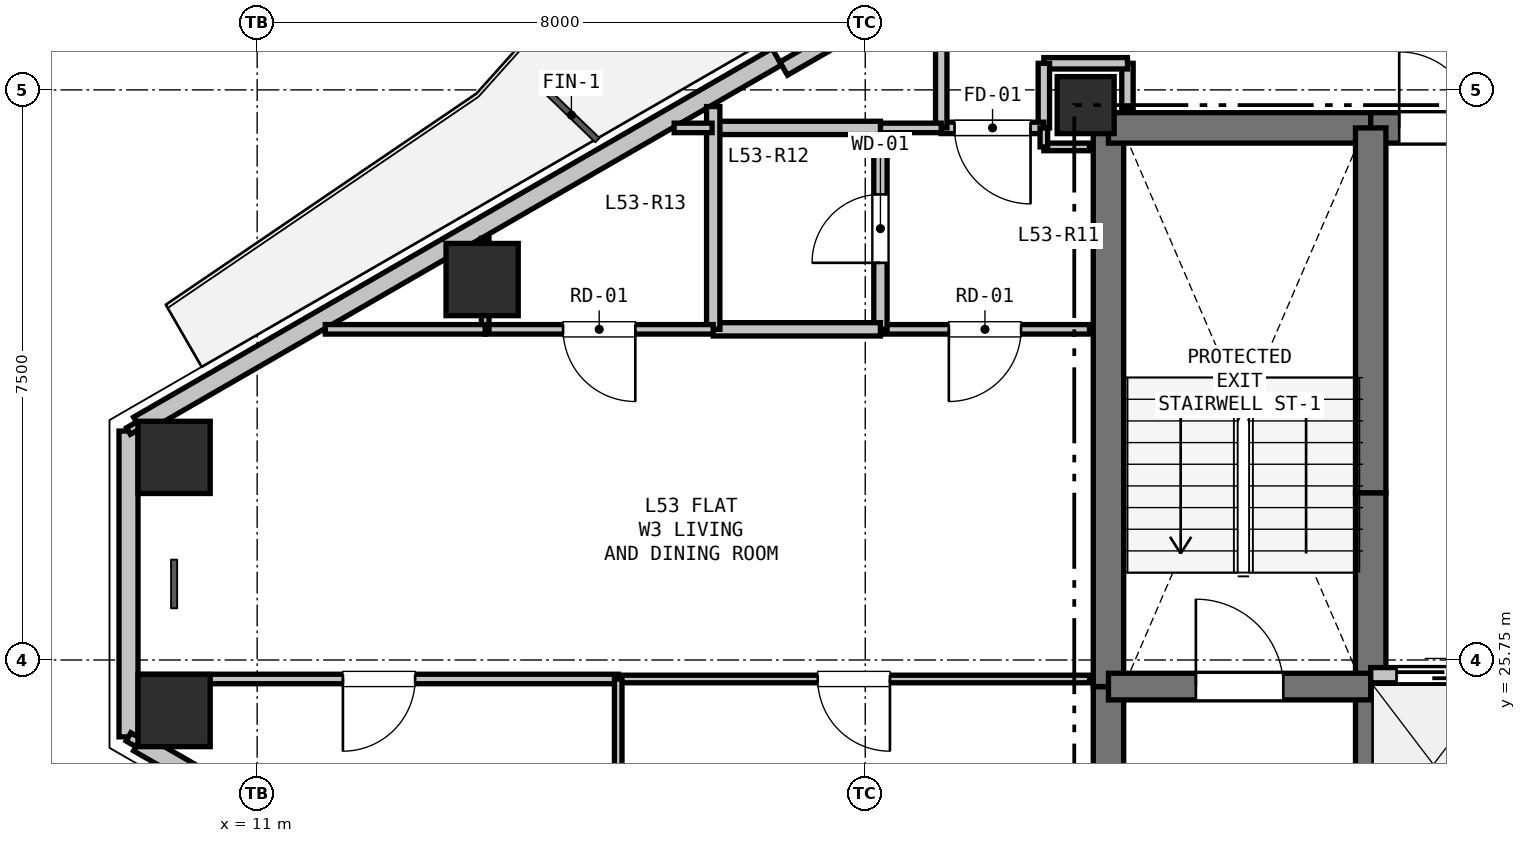
"""IFC4 building model, lengths in metres.
Left out: names, types, materials, properties, quantities, classifications, styles, units other than length and angle.
Written with IfcOpenShell. Run it as: python <this file> out.ifc"""

import sys

from ifc_helpers import new_model, si_unit, direction, frame, frame_2d, origin, origin_2d, place, context, subcontext, project, spatial, rectangle, hollow_rectangle, extrude, element, fill, save


model = new_model("IFC4")
c1 = context("Model", 3, precision=1e-05, world=origin(), true_north=direction((0.0, 1.0)))
c2 = subcontext(c1, "Body", "Model", "MODEL_VIEW")
j1 = project(units=[si_unit("LENGTHUNIT", "METRE"), si_unit("PLANEANGLEUNIT", "RADIAN")], contexts=[c1])
p1 = place(None, origin())
s1 = spatial("IfcSite", under=j1, at=p1, CompositionType="ELEMENT")
p2 = place(p1, origin())
s2 = spatial("IfcBuilding", under=s1, at=p2, CompositionType="ELEMENT")
p3 = place(p2, frame((0.0, 0.0, 192.0)))
s3 = spatial("IfcBuildingStorey", under=s2, at=p3, CompositionType="ELEMENT", Elevation=192.0)
p4 = place(p3, frame((21.9, 33.05, 0.0), z_axis=(0.0, 0.0, 1.0), x_axis=(1.0, 0.0, 0.0)))
e1 = element("IfcColumn", 1, at=p4, inside=s3, PredefinedType="COLUMN", context=c2, shape_type="SweptSolid", body=[
    extrude(rectangle(XDim=0.75, YDim=0.75, at=origin_2d()), origin(), (0.0, 0.0, 1.0), 3.3),
])
for number, where, z_axis, x_axis in (
    (2, (9.907, 28.415, 0.0), (0.0, 0.0, 1.0), (1.0, 0.0, 0.0)),
    (3, (13.96, 30.755, 0.0), (0.0, 0.0, 1.0), (1.0, 0.0, 0.0)),
    (4, (9.907, 25.085, 0.0), (0.0, 0.0, 1.0), (1.0, 0.0, 0.0)),
):
    element("IfcColumn", number, at=place(p3, frame(where, z_axis=z_axis, x_axis=x_axis)), inside=s3, PredefinedType="COLUMN", context=c2, shape_type="SweptSolid", body=[
        extrude(hollow_rectangle(XDim=0.95, YDim=0.95, WallThickness=0.028, at=origin_2d()), origin(), (0.0, 0.0, 1.0), 3.3),
    ])
p5 = place(p3, frame((9.308, 24.738, 0.0), z_axis=(0.0, 0.0, 1.0), x_axis=(0.0, 1.0, 0.0)))
e5 = element("IfcWall", 5, at=p5, inside=s3, PredefinedType="SOLIDWALL", context=c2, shape_type="SweptSolid", body=[
    extrude(rectangle(XDim=4.023, YDim=0.25, at=frame_2d((2.012, 0.0))), origin(), (0.0, 0.0, 1.0), 2.69),
])
p6 = place(p3, frame((9.438, 28.837, 0.0), z_axis=(0.0, 0.0, 1.0), x_axis=(0.866027133173, 0.499997004599, 0.0)))
e6 = element("IfcWall", 6, at=p6, inside=s3, PredefinedType="SOLIDWALL", context=c2, shape_type="SweptSolid", body=[
    extrude(rectangle(XDim=9.699, YDim=0.25, at=frame_2d((4.849, 0.0))), origin(), (0.0, 0.0, 1.0), 2.69),
])
p7 = place(p3, frame((17.927, 33.53, 0.0), z_axis=(0.0, 0.0, 1.0), x_axis=(0.86605165483, 0.499954529098, 0.0)))
e7 = element("IfcWall", 7, at=p7, inside=s3, PredefinedType="PARAPET", context=c2, shape_type="SweptSolid", body=[
    extrude(rectangle(XDim=1.7, YDim=0.2, at=frame_2d((0.85, 0.0))), origin(), (0.0, 0.0, 1.0), 2.69),
])
p8 = place(p3, frame((17.837, 19.814, 0.0), z_axis=(0.0, 0.0, 1.0), x_axis=(-0.866027133173, 0.499997004599, 0.0)))
e8 = element("IfcWall", 8, at=p8, inside=s3, PredefinedType="SOLIDWALL", context=c2, shape_type="SweptSolid", body=[
    extrude(rectangle(XDim=9.699, YDim=0.25, at=frame_2d((4.849, 0.0))), origin(), (0.0, 0.0, 1.0), 2.69),
])
p9 = place(p8, frame((5.512, 0.0, 0.9)))
e9 = element("IfcOpeningElement", 9, at=p9, cuts=e8, PredefinedType="OPENING", context=c2, shape_type="SweptSolid", body=[
    extrude(rectangle(XDim=1.2, YDim=1.4, at=frame_2d((0.6, 0.7))), frame((0.0, 0.135, 0.0), z_axis=(0.0, -1.0, 0.0), x_axis=(1.0, 0.0, 0.0)), (0.0, 0.0, 1.0), 0.27),
])
p10 = place(p3, frame((22.2, 20.75, 0.0), z_axis=(0.0, 0.0, 1.0), x_axis=(0.0, 1.0, 0.0)))
e10 = element("IfcWall", 10, at=p10, inside=s3, PredefinedType="SHEAR", context=c2, shape_type="SweptSolid", body=[
    extrude(rectangle(XDim=4.65, YDim=0.4, at=frame_2d((2.325, 0.0))), origin(), (0.0, 0.0, 1.0), 3.07),
])
p11 = place(p3, frame((22.2, 25.4, 0.0), z_axis=(0.0, 0.0, 1.0), x_axis=(0.0, 1.0, 0.0)))
e11 = element("IfcWall", 11, at=p11, inside=s3, PredefinedType="SHEAR", context=c2, shape_type="SweptSolid", body=[
    extrude(rectangle(XDim=7.35, YDim=0.4, at=frame_2d((3.675, 0.0))), origin(), (0.0, 0.0, 1.0), 3.07),
])
p12 = place(p3, frame((22.2, 32.75, 0.0), z_axis=(0.0, 0.0, 1.0), x_axis=(1.0, 0.0, 0.0)))
e12 = element("IfcWall", 12, at=p12, inside=s3, PredefinedType="SHEAR", context=c2, shape_type="SweptSolid", body=[
    extrude(rectangle(XDim=3.45, YDim=0.4, at=frame_2d((1.725, 0.0))), origin(), (0.0, 0.0, 1.0), 3.07),
])
p13 = place(p3, frame((25.65, 32.75, 0.0), z_axis=(0.0, 0.0, 1.0), x_axis=(1.0, 0.0, 0.0)))
e13 = element("IfcWall", 13, at=p13, inside=s3, PredefinedType="SHEAR", context=c2, shape_type="SweptSolid", body=[
    extrude(rectangle(XDim=1.75, YDim=0.4, at=frame_2d((0.875, 0.0))), origin(), (0.0, 0.0, 1.0), 3.07),
])
p14 = place(p13, frame((0.375, 0.0, 0.0)))
e14 = element("IfcOpeningElement", 14, at=p14, cuts=e13, PredefinedType="OPENING", context=c2, shape_type="SweptSolid", body=[
    extrude(rectangle(XDim=1.0, YDim=2.15, at=frame_2d((0.5, 1.075))), frame((0.0, 0.21, 0.0), z_axis=(0.0, -1.0, 0.0), x_axis=(1.0, 0.0, 0.0)), (0.0, 0.0, 1.0), 0.42),
])
p15 = place(p3, frame((25.65, 22.75, 0.0), z_axis=(0.0, 0.0, 1.0), x_axis=(0.0, 1.0, 0.0)))
e15 = element("IfcWall", 15, at=p15, inside=s3, PredefinedType="SHEAR", context=c2, shape_type="SweptSolid", body=[
    extrude(rectangle(XDim=2.8, YDim=0.4, at=frame_2d((1.4, 0.0))), origin(), (0.0, 0.0, 1.0), 3.07),
])
p16 = place(p3, frame((25.65, 25.55, 0.0), z_axis=(0.0, 0.0, 1.0), x_axis=(0.0, 1.0, 0.0)))
e16 = element("IfcWall", 16, at=p16, inside=s3, PredefinedType="SHEAR", context=c2, shape_type="SweptSolid", body=[
    extrude(rectangle(XDim=2.4, YDim=0.4, at=frame_2d((1.2, 0.0))), origin(), (0.0, 0.0, 1.0), 3.07),
])
p17 = place(p3, frame((25.65, 27.95, 0.0), z_axis=(0.0, 0.0, 1.0), x_axis=(0.0, 1.0, 0.0)))
e17 = element("IfcWall", 17, at=p17, inside=s3, PredefinedType="SHEAR", context=c2, shape_type="SweptSolid", body=[
    extrude(rectangle(XDim=4.8, YDim=0.4, at=frame_2d((2.4, 0.0))), origin(), (0.0, 0.0, 1.0), 3.07),
])
p18 = place(p3, frame((22.2, 25.4, 0.0), z_axis=(0.0, 0.0, 1.0), x_axis=(1.0, 0.0, 0.0)))
e18 = element("IfcWall", 18, at=p18, inside=s3, PredefinedType="SHEAR", context=c2, shape_type="SweptSolid", body=[
    extrude(rectangle(XDim=3.45, YDim=0.35, at=frame_2d((1.725, 0.0))), origin(), (0.0, 0.0, 1.0), 3.07),
])
p19 = place(p18, frame((1.15, 0.0, 0.0)))
e19 = element("IfcOpeningElement", 19, at=p19, cuts=e18, PredefinedType="OPENING", context=c2, shape_type="SweptSolid", body=[
    extrude(rectangle(XDim=1.15, YDim=2.15, at=frame_2d((0.575, 1.075))), frame((0.0, 0.185, 0.0), z_axis=(0.0, -1.0, 0.0), x_axis=(1.0, 0.0, 0.0)), (0.0, 0.0, 1.0), 0.37),
])
p20 = place(p3, frame((25.65, 25.55, 0.0), z_axis=(0.0, 0.0, 1.0), x_axis=(1.0, 0.0, 0.0)))
e20 = element("IfcWall", 20, at=p20, inside=s3, PredefinedType="PARTITIONING", context=c2, shape_type="SweptSolid", body=[
    extrude(rectangle(XDim=4.95, YDim=0.2, at=frame_2d((2.475, 0.0))), origin(), (0.0, 0.0, 1.0), 3.07),
])
p21 = place(p20, frame((0.34, 0.0, 0.0)))
e21 = element("IfcOpeningElement", 21, at=p21, cuts=e20, PredefinedType="OPENING", context=c2, shape_type="SweptSolid", body=[
    extrude(rectangle(XDim=1.1, YDim=2.15, at=frame_2d((0.55, 1.075))), frame((0.0, 0.11, 0.0), z_axis=(0.0, -1.0, 0.0), x_axis=(1.0, 0.0, 0.0)), (0.0, 0.0, 1.0), 0.22),
])
p22 = place(p20, frame((1.99, 0.0, 0.0)))
e22 = element("IfcOpeningElement", 22, at=p22, cuts=e20, PredefinedType="OPENING", context=c2, shape_type="SweptSolid", body=[
    extrude(rectangle(XDim=1.1, YDim=2.15, at=frame_2d((0.55, 1.075))), frame((0.0, 0.11, 0.0), z_axis=(0.0, -1.0, 0.0), x_axis=(1.0, 0.0, 0.0)), (0.0, 0.0, 1.0), 0.22),
])
p23 = place(p20, frame((3.64, 0.0, 0.0)))
e23 = element("IfcOpeningElement", 23, at=p23, cuts=e20, PredefinedType="OPENING", context=c2, shape_type="SweptSolid", body=[
    extrude(rectangle(XDim=1.1, YDim=2.15, at=frame_2d((0.55, 1.075))), frame((0.0, 0.11, 0.0), z_axis=(0.0, -1.0, 0.0), x_axis=(1.0, 0.0, 0.0)), (0.0, 0.0, 1.0), 0.22),
])
p24 = place(p3, frame((22.45, 33.0, 0.0), z_axis=(0.0, 0.0, 1.0), x_axis=(0.0, 1.0, 0.0)))
e24 = element("IfcWall", 24, at=p24, inside=s3, PredefinedType="PARTITIONING", context=c2, shape_type="SweptSolid", body=[
    extrude(rectangle(XDim=0.6, YDim=0.15, at=frame_2d((0.3, 0.0))), origin(), (0.0, 0.0, 1.0), 2.595),
])
p25 = place(p3, frame((22.45, 33.6, 0.0), z_axis=(0.0, 0.0, 1.0), x_axis=(-1.0, 0.0, 0.0)))
e25 = element("IfcWall", 25, at=p25, inside=s3, PredefinedType="PARTITIONING", context=c2, shape_type="SweptSolid", body=[
    extrude(rectangle(XDim=1.1, YDim=0.15, at=frame_2d((0.55, 0.0))), origin(), (0.0, 0.0, 1.0), 3.07),
])
p26 = place(p3, frame((21.35, 33.6, 0.0), z_axis=(0.0, 0.0, 1.0), x_axis=(0.0, -1.0, 0.0)))
e26 = element("IfcWall", 26, at=p26, inside=s3, PredefinedType="PARTITIONING", context=c2, shape_type="SweptSolid", body=[
    extrude(rectangle(XDim=0.85, YDim=0.15, at=frame_2d((0.425, 0.0))), origin(), (0.0, 0.0, 1.0), 2.518),
])
p27 = place(p3, frame((21.35, 32.75, 0.0), z_axis=(0.0, 0.0, 1.0), x_axis=(-1.0, 0.0, 0.0)))
e27 = element("IfcWall", 27, at=p27, inside=s3, PredefinedType="PARTITIONING", context=c2, shape_type="SweptSolid", body=[
    extrude(rectangle(XDim=1.35, YDim=0.15, at=frame_2d((0.675, 0.0))), origin(), (0.0, 0.0, 1.0), 2.518),
])
p28 = place(p27, frame((0.175, 0.0, 0.0)))
e28 = element("IfcOpeningElement", 28, at=p28, cuts=e27, PredefinedType="OPENING", context=c2, shape_type="SweptSolid", body=[
    extrude(rectangle(XDim=1.0, YDim=2.15, at=frame_2d((0.5, 1.075))), frame((0.0, 0.085, 0.0), z_axis=(0.0, -1.0, 0.0), x_axis=(1.0, 0.0, 0.0)), (0.0, 0.0, 1.0), 0.17),
])
p29 = place(p3, frame((20.0, 32.75, 0.0), z_axis=(0.0, 0.0, 1.0), x_axis=(0.0, 1.0, 0.0)))
e29 = element("IfcWall", 29, at=p29, inside=s3, PredefinedType="PARTITIONING", context=c2, shape_type="SweptSolid", body=[
    extrude(rectangle(XDim=2.141, YDim=0.15, at=frame_2d((1.071, 0.0))), origin(), (0.0, 0.0, 1.0), 2.365),
])
p30 = place(p3, frame((21.35, 32.5, 0.0), z_axis=(0.0, 0.0, 1.0), x_axis=(1.0, 0.0, 0.0)))
e30 = element("IfcWall", 30, at=p30, inside=s3, PredefinedType="PARTITIONING", context=c2, shape_type="SweptSolid", body=[
    extrude(rectangle(XDim=0.6, YDim=0.1, at=frame_2d((0.3, 0.0))), origin(), (0.0, 0.0, 1.0), 2.595),
])
p31 = place(p3, frame((21.95, 30.1, 0.0), z_axis=(0.0, 0.0, 1.0), x_axis=(-1.0, 0.0, 0.0)))
e31 = element("IfcWall", 31, at=p31, inside=s3, PredefinedType="PARTITIONING", context=c2, shape_type="SweptSolid", body=[
    extrude(rectangle(XDim=2.75, YDim=0.125, at=frame_2d((1.375, 0.0))), origin(), (0.0, 0.0, 1.0), 2.595),
])
p32 = place(p31, frame((0.9, 0.0, 0.0)))
e32 = element("IfcOpeningElement", 32, at=p32, cuts=e31, PredefinedType="OPENING", context=c2, shape_type="SweptSolid", body=[
    extrude(rectangle(XDim=0.95, YDim=2.1, at=frame_2d((0.475, 1.05))), frame((0.0, 0.073, 0.0), z_axis=(0.0, -1.0, 0.0), x_axis=(1.0, 0.0, 0.0)), (0.0, 0.0, 1.0), 0.145),
])
p33 = place(p3, frame((19.2, 30.1, 0.0), z_axis=(0.0, 0.0, 1.0), x_axis=(0.0, 1.0, 0.0)))
e33 = element("IfcWall", 33, at=p33, inside=s3, PredefinedType="PLUMBINGWALL", context=c2, shape_type="SweptSolid", body=[
    extrude(rectangle(XDim=2.65, YDim=0.175, at=frame_2d((1.325, 0.0))), origin(), (0.0, 0.0, 1.0), 2.518),
])
p34 = place(p33, frame((0.875, 0.0, 0.0)))
e34 = element("IfcOpeningElement", 34, at=p34, cuts=e33, PredefinedType="OPENING", context=c2, shape_type="SweptSolid", body=[
    extrude(rectangle(XDim=0.9, YDim=2.1, at=frame_2d((0.45, 1.05))), frame((0.0, 0.097, 0.0), z_axis=(0.0, -1.0, 0.0), x_axis=(1.0, 0.0, 0.0)), (0.0, 0.0, 1.0), 0.195),
])
p35 = place(p3, frame((19.2, 32.75, 0.0), z_axis=(0.0, 0.0, 1.0), x_axis=(1.0, 0.0, 0.0)))
e35 = element("IfcWall", 35, at=p35, inside=s3, PredefinedType="PARTITIONING", context=c2, shape_type="SweptSolid", body=[
    extrude(rectangle(XDim=0.8, YDim=0.125, at=frame_2d((0.4, 0.0))), origin(), (0.0, 0.0, 1.0), 3.07),
])
p36 = place(p3, frame((21.35, 32.75, 0.0), z_axis=(0.0, 0.0, 1.0), x_axis=(0.0, -1.0, 0.0)))
e36 = element("IfcWall", 36, at=p36, inside=s3, PredefinedType="PARTITIONING", context=c2, shape_type="SweptSolid", body=[
    extrude(rectangle(XDim=0.25, YDim=0.1, at=frame_2d((0.125, 0.0))), origin(), (0.0, 0.0, 1.0), 3.07),
])
p37 = place(p3, frame((17.0, 32.75, 0.0), z_axis=(0.0, 0.0, 1.0), x_axis=(1.0, 0.0, 0.0)))
e37 = element("IfcWall", 37, at=p37, inside=s3, PredefinedType="PLUMBINGWALL", context=c2, shape_type="SweptSolid", body=[
    extrude(rectangle(XDim=2.2, YDim=0.175, at=frame_2d((1.1, 0.0))), origin(), (0.0, 0.0, 1.0), 2.365),
])
p38 = place(p3, frame((19.2, 30.1, 0.0), z_axis=(0.0, 0.0, 1.0), x_axis=(-1.0, 0.0, 0.0)))
e38 = element("IfcWall", 38, at=p38, inside=s3, PredefinedType="PLUMBINGWALL", context=c2, shape_type="SweptSolid", body=[
    extrude(rectangle(XDim=2.2, YDim=0.175, at=frame_2d((1.1, 0.0))), origin(), (0.0, 0.0, 1.0), 3.07),
])
p39 = place(p3, frame((17.0, 30.1, 0.0), z_axis=(0.0, 0.0, 1.0), x_axis=(0.0, 1.0, 0.0)))
e39 = element("IfcWall", 39, at=p39, inside=s3, PredefinedType="PLUMBINGWALL", context=c2, shape_type="SweptSolid", body=[
    extrude(rectangle(XDim=2.931, YDim=0.175, at=frame_2d((1.465, 0.0))), origin(), (0.0, 0.0, 1.0), 2.365),
])
p40 = place(p3, frame((17.0, 30.1, 0.0), z_axis=(0.0, 0.0, 1.0), x_axis=(-1.0, 0.0, 0.0)))
e40 = element("IfcWall", 40, at=p40, inside=s3, PredefinedType="PARTITIONING", context=c2, shape_type="SweptSolid", body=[
    extrude(rectangle(XDim=3.0, YDim=0.125, at=frame_2d((1.5, 0.0))), origin(), (0.0, 0.0, 1.0), 3.07),
])
p41 = place(p40, frame((1.025, 0.0, 0.0)))
e41 = element("IfcOpeningElement", 41, at=p41, cuts=e40, PredefinedType="OPENING", context=c2, shape_type="SweptSolid", body=[
    extrude(rectangle(XDim=0.95, YDim=2.1, at=frame_2d((0.475, 1.05))), frame((0.0, 0.073, 0.0), z_axis=(0.0, -1.0, 0.0), x_axis=(1.0, 0.0, 0.0)), (0.0, 0.0, 1.0), 0.145),
])
p42 = place(p3, frame((14.0, 30.1, 0.0), z_axis=(0.0, 0.0, 1.0), x_axis=(0.0, 1.0, 0.0)))
e42 = element("IfcWall", 42, at=p42, inside=s3, PredefinedType="PARTITIONING", context=c2, shape_type="SweptSolid", body=[
    extrude(rectangle(XDim=1.199, YDim=0.1, at=frame_2d((0.599, 0.0))), origin(), (0.0, 0.0, 1.0), 3.07),
])
p43 = place(p3, frame((16.486, 32.75, 0.0), z_axis=(0.0, 0.0, 1.0), x_axis=(1.0, 0.0, 0.0)))
e43 = element("IfcWall", 43, at=p43, inside=s3, PredefinedType="PARTITIONING", context=c2, shape_type="SweptSolid", body=[
    extrude(rectangle(XDim=0.499, YDim=0.125, at=frame_2d((0.25, 0.0))), origin(), (0.0, 0.0, 1.0), 3.07),
])
p44 = place(p3, frame((11.896, 30.1, 0.0), z_axis=(0.0, 0.0, 1.0), x_axis=(1.0, 0.0, 0.0)))
e44 = element("IfcWall", 44, at=p44, inside=s3, PredefinedType="PARTITIONING", context=c2, shape_type="SweptSolid", body=[
    extrude(rectangle(XDim=2.104, YDim=0.125, at=frame_2d((1.052, 0.0))), origin(), (0.0, 0.0, 1.0), 2.795),
])
p45 = place(p3, frame((21.95, 25.5, 0.0), z_axis=(0.0, 0.0, 1.0), x_axis=(-1.0, 0.0, 0.0)))
e45 = element("IfcWall", 45, at=p45, inside=s3, PredefinedType="PARTITIONING", context=c2, shape_type="SweptSolid", body=[
    extrude(rectangle(XDim=6.2, YDim=0.1, at=frame_2d((3.1, 0.0))), origin(), (0.0, 0.0, 1.0), 2.595),
])
p46 = place(p45, frame((2.625, 0.0, 0.0)))
e46 = element("IfcOpeningElement", 46, at=p46, cuts=e45, PredefinedType="OPENING", context=c2, shape_type="SweptSolid", body=[
    extrude(rectangle(XDim=0.95, YDim=2.1, at=frame_2d((0.475, 1.05))), frame((0.0, 0.06, 0.0), z_axis=(0.0, -1.0, 0.0), x_axis=(1.0, 0.0, 0.0)), (0.0, 0.0, 1.0), 0.12),
])
p47 = place(p3, frame((15.75, 25.5, 0.0), z_axis=(0.0, 0.0, 1.0), x_axis=(-1.0, 0.0, 0.0)))
e47 = element("IfcWall", 47, at=p47, inside=s3, PredefinedType="PARTITIONING", context=c2, shape_type="SweptSolid", body=[
    extrude(rectangle(XDim=6.293, YDim=0.125, at=frame_2d((3.147, 0.0))), origin(), (0.0, 0.0, 1.0), 2.795),
])
p48 = place(p47, frame((2.672, 0.0, 0.0)))
e48 = element("IfcOpeningElement", 48, at=p48, cuts=e47, PredefinedType="OPENING", context=c2, shape_type="SweptSolid", body=[
    extrude(rectangle(XDim=0.95, YDim=2.1, at=frame_2d((0.475, 1.05))), frame((0.0, 0.073, 0.0), z_axis=(0.0, -1.0, 0.0), x_axis=(1.0, 0.0, 0.0)), (0.0, 0.0, 1.0), 0.145),
])
p49 = place(p3, frame((9.307, 28.762, 0.0), z_axis=(0.0, 0.0, 1.0), x_axis=(0.866239593359, 0.499628829129, 0.0)))
e49 = element("IfcWall", 49, at=p49, inside=s3, PredefinedType="PARTITIONING", context=c2, shape_type="SweptSolid", body=[
    extrude(rectangle(XDim=0.15, YDim=0.1, at=frame_2d((0.075, 0.0))), origin(), (0.0, 0.0, 1.0), 3.07),
])
p50 = place(p3, frame((9.437, 24.663, 0.0), z_axis=(0.0, 0.0, 1.0), x_axis=(-0.866239593359, 0.499628829129, 0.0)))
e50 = element("IfcWall", 50, at=p50, inside=s3, PredefinedType="PARTITIONING", context=c2, shape_type="SweptSolid", body=[
    extrude(rectangle(XDim=0.15, YDim=0.125, at=frame_2d((0.075, 0.0))), origin(), (0.0, 0.0, 1.0), 3.07),
])
p51 = place(p3, frame((15.75, 25.5, 0.0), z_axis=(0.0, 0.0, 1.0), x_axis=(0.0, -1.0, 0.0)))
e51 = element("IfcWall", 51, at=p51, inside=s3, PredefinedType="PARTITIONING", context=c2, shape_type="SweptSolid", body=[
    extrude(rectangle(XDim=4.309, YDim=0.1, at=frame_2d((2.155, 0.0))), origin(), (0.0, 0.0, 1.0), 2.365),
])
p52 = place(p51, frame((1.68, 0.0, 0.0)))
e52 = element("IfcOpeningElement", 52, at=p52, cuts=e51, PredefinedType="OPENING", context=c2, shape_type="SweptSolid", body=[
    extrude(rectangle(XDim=0.95, YDim=2.1, at=frame_2d((0.475, 1.05))), frame((0.0, 0.06, 0.0), z_axis=(0.0, -1.0, 0.0), x_axis=(1.0, 0.0, 0.0)), (0.0, 0.0, 1.0), 0.12),
])
p53 = place(p21, origin())
e53 = element("IfcDoor", 53, at=p53, inside=s3, OperationType="SLIDING_TO_LEFT", PredefinedType="DOOR", context=c2, shape_type="SweptSolid", body=[
    extrude(rectangle(XDim=1.1, YDim=2.15, at=frame_2d((0.55, 1.075))), frame((0.0, 0.025, 0.0), z_axis=(0.0, -1.0, 0.0), x_axis=(1.0, 0.0, 0.0)), (0.0, 0.0, 1.0), 0.05),
])
fill(e21, e53)
p54 = place(p14, origin())
e54 = element("IfcDoor", 54, at=p54, inside=s3, OperationType="SINGLE_SWING_LEFT", PredefinedType="DOOR", context=c2, shape_type="SweptSolid", body=[
    extrude(rectangle(XDim=1.0, YDim=2.15, at=frame_2d((0.5, 1.075))), frame((0.0, 0.025, 0.0), z_axis=(0.0, -1.0, 0.0), x_axis=(1.0, 0.0, 0.0)), (0.0, 0.0, 1.0), 0.05),
])
fill(e14, e54)
p55 = place(p19, origin())
e55 = element("IfcDoor", 55, at=p55, inside=s3, OperationType="SINGLE_SWING_LEFT", PredefinedType="DOOR", context=c2, shape_type="SweptSolid", body=[
    extrude(rectangle(XDim=1.15, YDim=2.15, at=frame_2d((0.575, 1.075))), frame((0.0, 0.025, 0.0), z_axis=(0.0, -1.0, 0.0), x_axis=(1.0, 0.0, 0.0)), (0.0, 0.0, 1.0), 0.05),
])
fill(e19, e55)
p56 = place(p28, origin())
e56 = element("IfcDoor", 56, at=p56, inside=s3, OperationType="SINGLE_SWING_LEFT", PredefinedType="DOOR", context=c2, shape_type="SweptSolid", body=[
    extrude(rectangle(XDim=1.0, YDim=2.15, at=frame_2d((0.5, 1.075))), frame((0.0, 0.025, 0.0), z_axis=(0.0, -1.0, 0.0), x_axis=(1.0, 0.0, 0.0)), (0.0, 0.0, 1.0), 0.05),
])
fill(e28, e56)
p57 = place(p34, origin())
e57 = element("IfcDoor", 57, at=p57, inside=s3, OperationType="SINGLE_SWING_LEFT", PredefinedType="DOOR", context=c2, shape_type="SweptSolid", body=[
    extrude(rectangle(XDim=0.9, YDim=2.1, at=frame_2d((0.45, 1.05))), frame((0.0, 0.025, 0.0), z_axis=(0.0, -1.0, 0.0), x_axis=(1.0, 0.0, 0.0)), (0.0, 0.0, 1.0), 0.05),
])
fill(e34, e57)
p58 = place(p32, origin())
e58 = element("IfcDoor", 58, at=p58, inside=s3, OperationType="SINGLE_SWING_RIGHT", PredefinedType="DOOR", context=c2, shape_type="SweptSolid", body=[
    extrude(rectangle(XDim=0.95, YDim=2.1, at=frame_2d((0.475, 1.05))), frame((0.0, 0.025, 0.0), z_axis=(0.0, -1.0, 0.0), x_axis=(1.0, 0.0, 0.0)), (0.0, 0.0, 1.0), 0.05),
])
fill(e32, e58)
p59 = place(p41, origin())
e59 = element("IfcDoor", 59, at=p59, inside=s3, OperationType="SINGLE_SWING_LEFT", PredefinedType="DOOR", context=c2, shape_type="SweptSolid", body=[
    extrude(rectangle(XDim=0.95, YDim=2.1, at=frame_2d((0.475, 1.05))), frame((0.0, 0.025, 0.0), z_axis=(0.0, -1.0, 0.0), x_axis=(1.0, 0.0, 0.0)), (0.0, 0.0, 1.0), 0.05),
])
fill(e41, e59)
p60 = place(p48, origin())
e60 = element("IfcDoor", 60, at=p60, inside=s3, OperationType="SINGLE_SWING_RIGHT", PredefinedType="DOOR", context=c2, shape_type="SweptSolid", body=[
    extrude(rectangle(XDim=0.95, YDim=2.1, at=frame_2d((0.475, 1.05))), frame((0.0, 0.025, 0.0), z_axis=(0.0, -1.0, 0.0), x_axis=(1.0, 0.0, 0.0)), (0.0, 0.0, 1.0), 0.05),
])
fill(e48, e60)
p61 = place(p46, origin())
e61 = element("IfcDoor", 61, at=p61, inside=s3, OperationType="SINGLE_SWING_LEFT", PredefinedType="DOOR", context=c2, shape_type="SweptSolid", body=[
    extrude(rectangle(XDim=0.95, YDim=2.1, at=frame_2d((0.475, 1.05))), frame((0.0, 0.025, 0.0), z_axis=(0.0, -1.0, 0.0), x_axis=(1.0, 0.0, 0.0)), (0.0, 0.0, 1.0), 0.05),
])
fill(e46, e61)
save(model, sys.argv[1])
